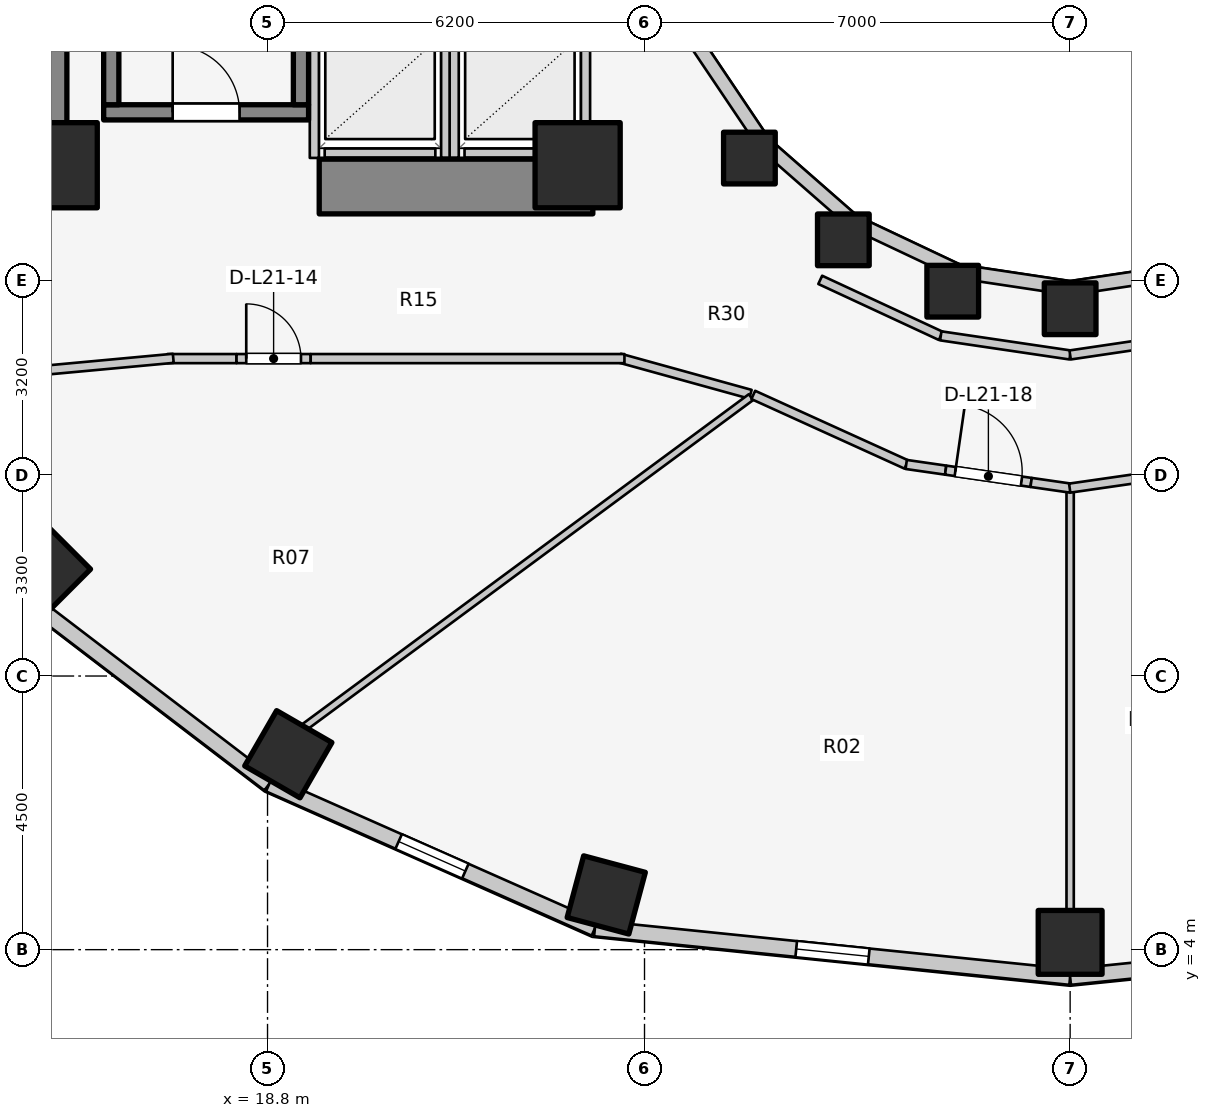
"""IFC4 building model, lengths in metres.
Left out: names, types, materials, properties, quantities, classifications, styles, units other than length and angle.
Written with IfcOpenShell. Run it as: python <this file> out.ifc"""

import sys

from ifc_helpers import new_model, si_unit, direction, frame, frame_2d, origin, origin_2d, place, context, subcontext, project, spatial, rectangle, extrude, element, fill, save


model = new_model("IFC4")
c1 = context("Model", 3, precision=1e-05, world=origin(), true_north=direction((0.0, 1.0)))
c2 = subcontext(c1, "Body", "Model", "MODEL_VIEW")
j1 = project(units=[si_unit("LENGTHUNIT", "METRE"), si_unit("PLANEANGLEUNIT", "RADIAN")], contexts=[c1])
p1 = place(None, origin())
s1 = spatial("IfcSite", under=j1, at=p1, CompositionType="ELEMENT")
p2 = place(p1, origin())
s2 = spatial("IfcBuilding", under=s1, at=p2, CompositionType="ELEMENT")
p3 = place(p2, frame((0.0, 0.0, 73.2)))
s3 = spatial("IfcBuildingStorey", under=s2, at=p3, CompositionType="ELEMENT", Elevation=73.2)
p4 = place(p3, frame((15.05, 17.05, 0.0), z_axis=(0.0, 0.0, 1.0), x_axis=(0.0, 1.0, 0.0)))
e1 = element("IfcWall", 1, at=p4, inside=s3, PredefinedType="SHEAR", context=c2, shape_type="SweptSolid", body=[
    extrude(rectangle(XDim=12.8, YDim=0.9, at=frame_2d((6.4, 0.0))), origin(), (0.0, 0.0, 1.0), 3.1),
])
p5 = place(p3, frame((19.65, 16.55, 0.0), z_axis=(0.0, 0.0, 1.0), x_axis=(1.0, 0.0, 0.0)))
e2 = element("IfcWall", 2, at=p5, inside=s3, PredefinedType="SHEAR", context=c2, shape_type="SweptSolid", body=[
    extrude(rectangle(XDim=4.5, YDim=0.9, at=frame_2d((2.25, 0.0))), origin(), (0.0, 0.0, 1.0), 3.1),
])
p6 = place(p3, frame((16.105, 17.77, 0.0), z_axis=(0.0, 0.0, 1.0), x_axis=(1.0, 0.0, 0.0)))
e3 = element("IfcWall", 3, at=p6, inside=s3, PredefinedType="SOLIDWALL", context=c2, shape_type="SweptSolid", body=[
    extrude(rectangle(XDim=3.37, YDim=0.25, at=frame_2d((1.685, 0.0))), origin(), (0.0, 0.0, 1.0), 3.1),
])
p7 = place(p6, frame((1.135, 0.0, 0.0)))
e4 = element("IfcOpeningElement", 4, at=p7, cuts=e3, PredefinedType="OPENING", context=c2, shape_type="SweptSolid", body=[
    extrude(rectangle(XDim=1.1, YDim=2.1, at=frame_2d((0.55, 1.05))), frame((0.0, 0.135, 0.0), z_axis=(0.0, -1.0, 0.0), x_axis=(1.0, 0.0, 0.0)), (0.0, 0.0, 1.0), 0.27),
])
for number, where, z_axis, x_axis in (
    (5, (16.23, 17.895, 0.0), (0.0, 0.0, 1.0), (0.0, 1.0, 0.0)),
    (6, (19.35, 17.895, 0.0), (0.0, 0.0, 1.0), (0.0, 1.0, 0.0)),
):
    element("IfcWall", number, at=place(p3, frame(where, z_axis=z_axis, x_axis=x_axis)), inside=s3, PredefinedType="SOLIDWALL", context=c2, shape_type="SweptSolid", body=[
        extrude(rectangle(XDim=7.81, YDim=0.25, at=frame_2d((3.905, 0.0))), origin(), (0.0, 0.0, 1.0), 3.1),
    ])
for number, where, z_axis, x_axis in (
    (7, (15.3, 16.9, 0.0), (0.0, 0.0, 1.0), (1.0, 0.0, 0.0)),
    (8, (23.9, 16.9, 0.0), (0.0, 0.0, 1.0), (1.0, 0.0, 0.0)),
):
    element("IfcColumn", number, at=place(p3, frame(where, z_axis=z_axis, x_axis=x_axis)), inside=s3, PredefinedType="COLUMN", context=c2, shape_type="SweptSolid", body=[
        extrude(rectangle(XDim=1.4, YDim=1.4, at=origin_2d()), origin(), (0.0, 0.0, 1.0), 3.1),
    ])
p8 = place(p3, frame((26.725, 17.018, 0.0), z_axis=(0.0, 0.0, 1.0), x_axis=(1.0, 0.0, 0.0)))
e9 = element("IfcColumn", 9, at=p8, inside=s3, PredefinedType="COLUMN", context=c2, shape_type="SweptSolid", body=[
    extrude(rectangle(XDim=0.85, YDim=0.85, at=origin_2d()), origin(), (0.0, 0.0, 1.0), 3.1),
])
p9 = place(p3, frame((15.147, 10.257, 0.0), z_axis=(0.0, 0.0, 1.0), x_axis=(-0.707106781187, -0.707106781187, 0.0)))
e10 = element("IfcColumn", 10, at=p9, inside=s3, PredefinedType="COLUMN", context=c2, shape_type="SweptSolid", body=[
    extrude(rectangle(XDim=1.05, YDim=1.05, at=origin_2d()), origin(), (0.0, 0.0, 1.0), 3.1),
])
p10 = place(p3, frame((28.27, 15.673, 0.0), z_axis=(0.0, 0.0, 1.0), x_axis=(1.0, 0.0, 0.0)))
e11 = element("IfcColumn", 11, at=p10, inside=s3, PredefinedType="COLUMN", context=c2, shape_type="SweptSolid", body=[
    extrude(rectangle(XDim=0.85, YDim=0.85, at=origin_2d()), origin(), (0.0, 0.0, 1.0), 3.1),
])
p11 = place(p3, frame((19.142, 7.214, 0.0), z_axis=(0.0, 0.0, 1.0), x_axis=(-0.5, -0.866025403784, 0.0)))
e12 = element("IfcColumn", 12, at=p11, inside=s3, PredefinedType="COLUMN", context=c2, shape_type="SweptSolid", body=[
    extrude(rectangle(XDim=1.05, YDim=1.05, at=origin_2d()), origin(), (0.0, 0.0, 1.0), 3.1),
])
p12 = place(p3, frame((30.069, 14.828, 0.0), z_axis=(0.0, 0.0, 1.0), x_axis=(1.0, 0.0, 0.0)))
e13 = element("IfcColumn", 13, at=p12, inside=s3, PredefinedType="COLUMN", context=c2, shape_type="SweptSolid", body=[
    extrude(rectangle(XDim=0.85, YDim=0.85, at=origin_2d()), origin(), (0.0, 0.0, 1.0), 3.1),
])
p13 = place(p3, frame((24.371, 4.9, 0.0), z_axis=(0.0, 0.0, 1.0), x_axis=(-0.258819045103, -0.965925826289, 0.0)))
e14 = element("IfcColumn", 14, at=p13, inside=s3, PredefinedType="COLUMN", context=c2, shape_type="SweptSolid", body=[
    extrude(rectangle(XDim=1.05, YDim=1.05, at=origin_2d()), origin(), (0.0, 0.0, 1.0), 3.1),
])
p14 = place(p3, frame((32.0, 14.54, 0.0), z_axis=(0.0, 0.0, 1.0), x_axis=(1.0, 0.0, 0.0)))
e15 = element("IfcColumn", 15, at=p14, inside=s3, PredefinedType="COLUMN", context=c2, shape_type="SweptSolid", body=[
    extrude(rectangle(XDim=0.85, YDim=0.85, at=origin_2d()), origin(), (0.0, 0.0, 1.0), 3.1),
])
p15 = place(p3, frame((32.0, 4.12, 0.0), z_axis=(0.0, 0.0, 1.0), x_axis=(0.0, -1.0, 0.0)))
e16 = element("IfcColumn", 16, at=p15, inside=s3, PredefinedType="COLUMN", context=c2, shape_type="SweptSolid", body=[
    extrude(rectangle(XDim=1.05, YDim=1.05, at=origin_2d()), origin(), (0.0, 0.0, 1.0), 3.1),
])
p16 = place(p3, frame((25.834, 18.94, 0.0), z_axis=(0.0, 0.0, 1.0), x_axis=(0.558197800898, -0.829707909492, 0.0)))
e17 = element("IfcWall", 17, at=p16, inside=s3, PredefinedType="STANDARD", context=c2, shape_type="SweptSolid", body=[
    extrude(rectangle(XDim=2.027, YDim=0.23, at=frame_2d((1.013, 0.0))), origin(), (0.0, 0.0, 1.0), 1.22),
])
p17 = place(p3, frame((26.965, 17.258, 0.0), z_axis=(0.0, 0.0, 1.0), x_axis=(0.752576694707, -0.658504607869, 0.0)))
e18 = element("IfcWall", 18, at=p17, inside=s3, PredefinedType="STANDARD", context=c2, shape_type="SweptSolid", body=[
    extrude(rectangle(XDim=1.959, YDim=0.23, at=frame_2d((0.98, 0.0))), origin(), (0.0, 0.0, 1.0), 1.22),
])
p18 = place(p3, frame((28.44, 15.968, 0.0), z_axis=(0.0, 0.0, 1.0), x_axis=(0.904179699603, -0.427152280606, 0.0)))
e19 = element("IfcWall", 19, at=p18, inside=s3, PredefinedType="STANDARD", context=c2, shape_type="SweptSolid", body=[
    extrude(rectangle(XDim=1.899, YDim=0.23, at=frame_2d((0.95, 0.0))), origin(), (0.0, 0.0, 1.0), 1.22),
])
for number, where, z_axis, x_axis in (
    (20, (30.157, 15.157, 0.0), (0.0, 0.0, 1.0), (0.989, -0.149, 0.0)),
    (21, (32.0, 14.88, 0.0), (0.0, 0.0, 1.0), (0.989, 0.149, 0.0)),
):
    element("IfcWall", number, at=place(p3, frame(where, z_axis=z_axis, x_axis=x_axis)), inside=s3, PredefinedType="STANDARD", context=c2, shape_type="SweptSolid", body=[
        extrude(rectangle(XDim=1.864, YDim=0.23, at=frame_2d((0.932, 0.0))), origin(), (0.0, 0.0, 1.0), 1.22),
    ])
p19 = place(p3, frame((14.734, 9.847, 0.0), z_axis=(0.0, 0.0, 1.0), x_axis=(0.794809810864, -0.606858603427, 0.0)))
e22 = element("IfcWall", 22, at=p19, inside=s3, PredefinedType="STANDARD", context=c2, shape_type="SweptSolid", body=[
    extrude(rectangle(XDim=5.149, YDim=0.26, at=frame_2d((2.575, 0.0))), origin(), (0.0, 0.0, 1.0), 1.22),
])
p20 = place(p3, frame((18.827, 6.722, 0.0), z_axis=(0.0, 0.0, 1.0), x_axis=(0.914336605747, -0.404955023911, 0.0)))
e23 = element("IfcWall", 23, at=p20, inside=s3, PredefinedType="STANDARD", context=c2, shape_type="SweptSolid", body=[
    extrude(rectangle(XDim=5.859, YDim=0.26, at=frame_2d((2.929, 0.0))), origin(), (0.0, 0.0, 1.0), 1.22),
])
p21 = place(p20, frame((2.329, 0.0, 0.15)))
e24 = element("IfcOpeningElement", 24, at=p21, cuts=e23, PredefinedType="OPENING", context=c2, shape_type="SweptSolid", body=[
    extrude(rectangle(XDim=1.2, YDim=0.9, at=frame_2d((0.6, 0.45))), frame((0.0, 0.14, 0.0), z_axis=(0.0, -1.0, 0.0), x_axis=(1.0, 0.0, 0.0)), (0.0, 0.0, 1.0), 0.28),
])
p22 = place(p3, frame((24.184, 4.349, 0.0), z_axis=(0.0, 0.0, 1.0), x_axis=(0.994821390558, -0.101638579726, 0.0)))
e25 = element("IfcWall", 25, at=p22, inside=s3, PredefinedType="STANDARD", context=c2, shape_type="SweptSolid", body=[
    extrude(rectangle(XDim=7.857, YDim=0.26, at=frame_2d((3.929, 0.0))), origin(), (0.0, 0.0, 1.0), 1.22),
])
p23 = place(p22, frame((3.329, 0.0, 0.15)))
e26 = element("IfcOpeningElement", 26, at=p23, cuts=e25, PredefinedType="OPENING", context=c2, shape_type="SweptSolid", body=[
    extrude(rectangle(XDim=1.2, YDim=0.9, at=frame_2d((0.6, 0.45))), frame((0.0, 0.14, 0.0), z_axis=(0.0, -1.0, 0.0), x_axis=(1.0, 0.0, 0.0)), (0.0, 0.0, 1.0), 0.28),
])
p24 = place(p3, frame((32.0, 3.551, 0.0), z_axis=(0.0, 0.0, 1.0), x_axis=(0.994821390558, 0.101638579726, 0.0)))
e27 = element("IfcWall", 27, at=p24, inside=s3, PredefinedType="STANDARD", context=c2, shape_type="SweptSolid", body=[
    extrude(rectangle(XDim=7.857, YDim=0.26, at=frame_2d((3.929, 0.0))), origin(), (0.0, 0.0, 1.0), 1.22),
])
p25 = place(p24, frame((3.329, 0.0, 0.15)))
e28 = element("IfcOpeningElement", 28, at=p25, cuts=e27, PredefinedType="OPENING", context=c2, shape_type="SweptSolid", body=[
    extrude(rectangle(XDim=1.2, YDim=0.9, at=frame_2d((0.6, 0.45))), frame((0.0, 0.14, 0.0), z_axis=(0.0, -1.0, 0.0), x_axis=(1.0, 0.0, 0.0)), (0.0, 0.0, 1.0), 0.28),
])
p26 = place(p3, frame((19.74, 17.1, 0.0), z_axis=(0.0, 0.0, 1.0), x_axis=(1.0, 0.0, 0.0)))
e29 = element("IfcWall", 29, at=p26, inside=s3, PredefinedType="SOLIDWALL", context=c2, shape_type="SweptSolid", body=[
    extrude(rectangle(XDim=1.82, YDim=0.15, at=frame_2d((0.91, 0.0))), origin(), (0.0, 0.0, 1.0), 2.575),
])
p27 = place(p3, frame((19.57, 17.02, 0.0), z_axis=(0.0, 0.0, 1.0), x_axis=(0.0, 1.0, 0.0)))
e30 = element("IfcWall", 30, at=p27, inside=s3, PredefinedType="SOLIDWALL", context=c2, shape_type="SweptSolid", body=[
    extrude(rectangle(XDim=2.22, YDim=0.15, at=frame_2d((1.11, 0.0))), origin(), (0.0, 0.0, 1.0), 2.12),
])
p28 = place(p3, frame((21.73, 17.02, 0.0), z_axis=(0.0, 0.0, 1.0), x_axis=(0.0, 1.0, 0.0)))
e31 = element("IfcWall", 31, at=p28, inside=s3, PredefinedType="SOLIDWALL", context=c2, shape_type="SweptSolid", body=[
    extrude(rectangle(XDim=2.22, YDim=0.15, at=frame_2d((1.11, 0.0))), origin(), (0.0, 0.0, 1.0), 2.575),
])
p29 = place(p3, frame((22.04, 17.1, 0.0), z_axis=(0.0, 0.0, 1.0), x_axis=(1.0, 0.0, 0.0)))
e32 = element("IfcWall", 32, at=p29, inside=s3, PredefinedType="SOLIDWALL", context=c2, shape_type="SweptSolid", body=[
    extrude(rectangle(XDim=1.82, YDim=0.15, at=frame_2d((0.91, 0.0))), origin(), (0.0, 0.0, 1.0), 2.12),
])
p30 = place(p3, frame((21.87, 17.02, 0.0), z_axis=(0.0, 0.0, 1.0), x_axis=(0.0, 1.0, 0.0)))
e33 = element("IfcWall", 33, at=p30, inside=s3, PredefinedType="SOLIDWALL", context=c2, shape_type="SweptSolid", body=[
    extrude(rectangle(XDim=2.22, YDim=0.15, at=frame_2d((1.11, 0.0))), origin(), (0.0, 0.0, 1.0), 2.575),
])
p31 = place(p3, frame((24.03, 17.02, 0.0), z_axis=(0.0, 0.0, 1.0), x_axis=(0.0, 1.0, 0.0)))
e34 = element("IfcWall", 34, at=p31, inside=s3, PredefinedType="SOLIDWALL", context=c2, shape_type="SweptSolid", body=[
    extrude(rectangle(XDim=2.22, YDim=0.15, at=frame_2d((1.11, 0.0))), origin(), (0.0, 0.0, 1.0), 1.873),
])
p32 = place(p3, frame((27.89, 15.015, 0.0), z_axis=(0.0, 0.0, 1.0), x_axis=(0.906943449489, -0.421252393975, 0.0)))
e35 = element("IfcWall", 35, at=p32, inside=s3, PredefinedType="PARTITIONING", context=c2, shape_type="SweptSolid", body=[
    extrude(rectangle(XDim=2.186, YDim=0.15, at=frame_2d((1.093, 0.0))), origin(), (0.0, 0.0, 1.0), 1.22),
])
for number, where, z_axis, x_axis in (
    (36, (29.873, 14.094, 0.0), (0.0, 0.0, 1.0), (0.989, -0.146, 0.0)),
    (37, (32.0, 13.78, 0.0), (0.0, 0.0, 1.0), (0.989, 0.146, 0.0)),
):
    element("IfcWall", number, at=place(p3, frame(where, z_axis=z_axis, x_axis=x_axis)), inside=s3, PredefinedType="PARTITIONING", context=c2, shape_type="SweptSolid", body=[
        extrude(rectangle(XDim=2.151, YDim=0.15, at=frame_2d((1.075, 0.0))), origin(), (0.0, 0.0, 1.0), 1.22),
    ])
p33 = place(p3, frame((26.742, 13.133, 0.0), z_axis=(0.0, 0.0, 1.0), x_axis=(-0.963833843713, 0.266503886865, 0.0)))
e38 = element("IfcWall", 38, at=p33, inside=s3, PredefinedType="PARTITIONING", context=c2, shape_type="SweptSolid", body=[
    extrude(rectangle(XDim=2.232, YDim=0.15, at=frame_2d((1.116, 0.0))), origin(), (0.0, 0.0, 1.0), 1.22),
])
p34 = place(p3, frame((17.15, 13.72, 0.0), z_axis=(0.0, 0.0, 1.0), x_axis=(1.0, 0.0, 0.0)))
e39 = element("IfcWall", 39, at=p34, inside=s3, PredefinedType="PARTITIONING", context=c2, shape_type="SweptSolid", body=[
    extrude(rectangle(XDim=1.14, YDim=0.15, at=frame_2d((0.57, 0.0))), origin(), (0.0, 0.0, 1.0), 2.575),
])
p35 = place(p3, frame((18.29, 13.72, 0.0), z_axis=(0.0, 0.0, 1.0), x_axis=(1.0, 0.0, 0.0)))
e40 = element("IfcWall", 40, at=p35, inside=s3, PredefinedType="PARTITIONING", context=c2, shape_type="SweptSolid", body=[
    extrude(rectangle(XDim=1.22, YDim=0.15, at=frame_2d((0.61, 0.0))), origin(), (0.0, 0.0, 1.0), 2.575),
])
p36 = place(p35, frame((0.16, 0.0, 0.0)))
e41 = element("IfcOpeningElement", 41, at=p36, cuts=e40, PredefinedType="OPENING", context=c2, shape_type="SweptSolid", body=[
    extrude(rectangle(XDim=0.9, YDim=2.1, at=frame_2d((0.45, 1.05))), frame((0.0, 0.085, 0.0), z_axis=(0.0, -1.0, 0.0), x_axis=(1.0, 0.0, 0.0)), (0.0, 0.0, 1.0), 0.17),
])
p37 = place(p3, frame((19.51, 13.72, 0.0), z_axis=(0.0, 0.0, 1.0), x_axis=(1.0, 0.0, 0.0)))
e42 = element("IfcWall", 42, at=p37, inside=s3, PredefinedType="PARTITIONING", context=c2, shape_type="SweptSolid", body=[
    extrude(rectangle(XDim=5.16, YDim=0.15, at=frame_2d((2.58, 0.0))), origin(), (0.0, 0.0, 1.0), 1.22),
])
p38 = place(p3, frame((17.25, 13.725, 0.0), z_axis=(0.0, 0.0, 1.0), x_axis=(-0.995748209098, -0.092116795851, 0.0)))
e43 = element("IfcWall", 43, at=p38, inside=s3, PredefinedType="PARTITIONING", context=c2, shape_type="SweptSolid", body=[
    extrude(rectangle(XDim=6.112, YDim=0.15, at=frame_2d((3.056, 0.0))), origin(), (0.0, 0.0, 1.0), 1.22),
])
p39 = place(p3, frame((26.751, 13.086, 0.0), z_axis=(0.0, 0.0, 1.0), x_axis=(-0.80430981394, -0.594210167533, 0.0)))
e44 = element("IfcWall", 44, at=p39, inside=s3, PredefinedType="MOVABLE", context=c2, shape_type="SweptSolid", body=[
    extrude(rectangle(XDim=9.146, YDim=0.12, at=frame_2d((4.573, 0.0))), origin(), (0.0, 0.0, 1.0), 1.22),
])
p40 = place(p3, frame((32.0, 11.535, 0.0), z_axis=(0.0, 0.0, 1.0), x_axis=(0.0, -1.0, 0.0)))
e45 = element("IfcWall", 45, at=p40, inside=s3, PredefinedType="MOVABLE", context=c2, shape_type="SweptSolid", body=[
    extrude(rectangle(XDim=6.91, YDim=0.12, at=frame_2d((3.455, 0.0))), origin(), (0.0, 0.0, 1.0), 1.22),
])
p41 = place(p3, frame((26.789, 13.123, 0.0), z_axis=(0.0, 0.0, 1.0), x_axis=(0.910435980343, -0.413650003865, 0.0)))
e46 = element("IfcWall", 46, at=p41, inside=s3, PredefinedType="PARTITIONING", context=c2, shape_type="SweptSolid", body=[
    extrude(rectangle(XDim=2.766, YDim=0.15, at=frame_2d((1.383, 0.0))), origin(), (0.0, 0.0, 1.0), 1.22),
])
p42 = place(p3, frame((29.304, 11.979, 0.0), z_axis=(0.0, 0.0, 1.0), x_axis=(0.989829975321, -0.142255474256, 0.0)))
e47 = element("IfcWall", 47, at=p42, inside=s3, PredefinedType="PARTITIONING", context=c2, shape_type="SweptSolid", body=[
    extrude(rectangle(XDim=0.656, YDim=0.15, at=frame_2d((0.328, 0.0))), origin(), (0.0, 0.0, 1.0), 2.575),
])
p43 = place(p3, frame((29.953, 11.886, 0.0), z_axis=(0.0, 0.0, 1.0), x_axis=(0.98979070052, -0.142528485449, 0.0)))
e48 = element("IfcWall", 48, at=p43, inside=s3, PredefinedType="PARTITIONING", context=c2, shape_type="SweptSolid", body=[
    extrude(rectangle(XDim=1.42, YDim=0.15, at=frame_2d((0.71, 0.0))), origin(), (0.0, 0.0, 1.0), 2.575),
])
p44 = place(p43, frame((0.16, 0.0, 0.0)))
e49 = element("IfcOpeningElement", 49, at=p44, cuts=e48, PredefinedType="OPENING", context=c2, shape_type="SweptSolid", body=[
    extrude(rectangle(XDim=1.1, YDim=2.1, at=frame_2d((0.55, 1.05))), frame((0.0, 0.085, 0.0), z_axis=(0.0, -1.0, 0.0), x_axis=(1.0, 0.0, 0.0)), (0.0, 0.0, 1.0), 0.17),
])
p45 = place(p3, frame((31.358, 11.684, 0.0), z_axis=(0.0, 0.0, 1.0), x_axis=(0.989777474181, -0.142620305723, 0.0)))
e50 = element("IfcWall", 50, at=p45, inside=s3, PredefinedType="PARTITIONING", context=c2, shape_type="SweptSolid", body=[
    extrude(rectangle(XDim=0.656, YDim=0.15, at=frame_2d((0.328, 0.0))), origin(), (0.0, 0.0, 1.0), 1.22),
])
p46 = place(p3, frame((31.993, 11.59, 0.0), z_axis=(0.0, 0.0, 1.0), x_axis=(0.989796962007, 0.142484995705, 0.0)))
e51 = element("IfcWall", 51, at=p46, inside=s3, PredefinedType="PARTITIONING", context=c2, shape_type="SweptSolid", body=[
    extrude(rectangle(XDim=2.731, YDim=0.15, at=frame_2d((1.366, 0.0))), origin(), (0.0, 0.0, 1.0), 1.22),
])
p47 = place(p21, origin())
e52 = element("IfcWindow", 52, at=p47, inside=s3, PartitioningType="SINGLE_PANEL", PredefinedType="WINDOW", context=c2, shape_type="SweptSolid", body=[
    extrude(rectangle(XDim=1.2, YDim=0.9, at=frame_2d((0.6, 0.45))), frame((0.0, 0.03, 0.0), z_axis=(0.0, -1.0, 0.0), x_axis=(1.0, 0.0, 0.0)), (0.0, 0.0, 1.0), 0.06),
])
fill(e24, e52)
p48 = place(p23, origin())
e53 = element("IfcWindow", 53, at=p48, inside=s3, PartitioningType="SINGLE_PANEL", PredefinedType="WINDOW", context=c2, shape_type="SweptSolid", body=[
    extrude(rectangle(XDim=1.2, YDim=0.9, at=frame_2d((0.6, 0.45))), frame((0.0, 0.03, 0.0), z_axis=(0.0, -1.0, 0.0), x_axis=(1.0, 0.0, 0.0)), (0.0, 0.0, 1.0), 0.06),
])
fill(e26, e53)
p49 = place(p7, origin())
e54 = element("IfcDoor", 54, at=p49, inside=s3, OperationType="SINGLE_SWING_LEFT", PredefinedType="DOOR", context=c2, shape_type="SweptSolid", body=[
    extrude(rectangle(XDim=1.1, YDim=2.1, at=frame_2d((0.55, 1.05))), frame((0.0, 0.025, 0.0), z_axis=(0.0, -1.0, 0.0), x_axis=(1.0, 0.0, 0.0)), (0.0, 0.0, 1.0), 0.05),
])
fill(e4, e54)
p50 = place(p36, origin())
e55 = element("IfcDoor", 55, at=p50, inside=s3, OperationType="SINGLE_SWING_LEFT", PredefinedType="DOOR", context=c2, shape_type="SweptSolid", body=[
    extrude(rectangle(XDim=0.9, YDim=2.1, at=frame_2d((0.45, 1.05))), frame((0.0, 0.025, 0.0), z_axis=(0.0, -1.0, 0.0), x_axis=(1.0, 0.0, 0.0)), (0.0, 0.0, 1.0), 0.05),
])
fill(e41, e55)
p51 = place(p44, origin())
e56 = element("IfcDoor", 56, at=p51, inside=s3, OperationType="SINGLE_SWING_LEFT", PredefinedType="DOOR", context=c2, shape_type="SweptSolid", body=[
    extrude(rectangle(XDim=1.1, YDim=2.1, at=frame_2d((0.55, 1.05))), frame((0.0, 0.025, 0.0), z_axis=(0.0, -1.0, 0.0), x_axis=(1.0, 0.0, 0.0)), (0.0, 0.0, 1.0), 0.05),
])
fill(e49, e56)
save(model, sys.argv[1])
